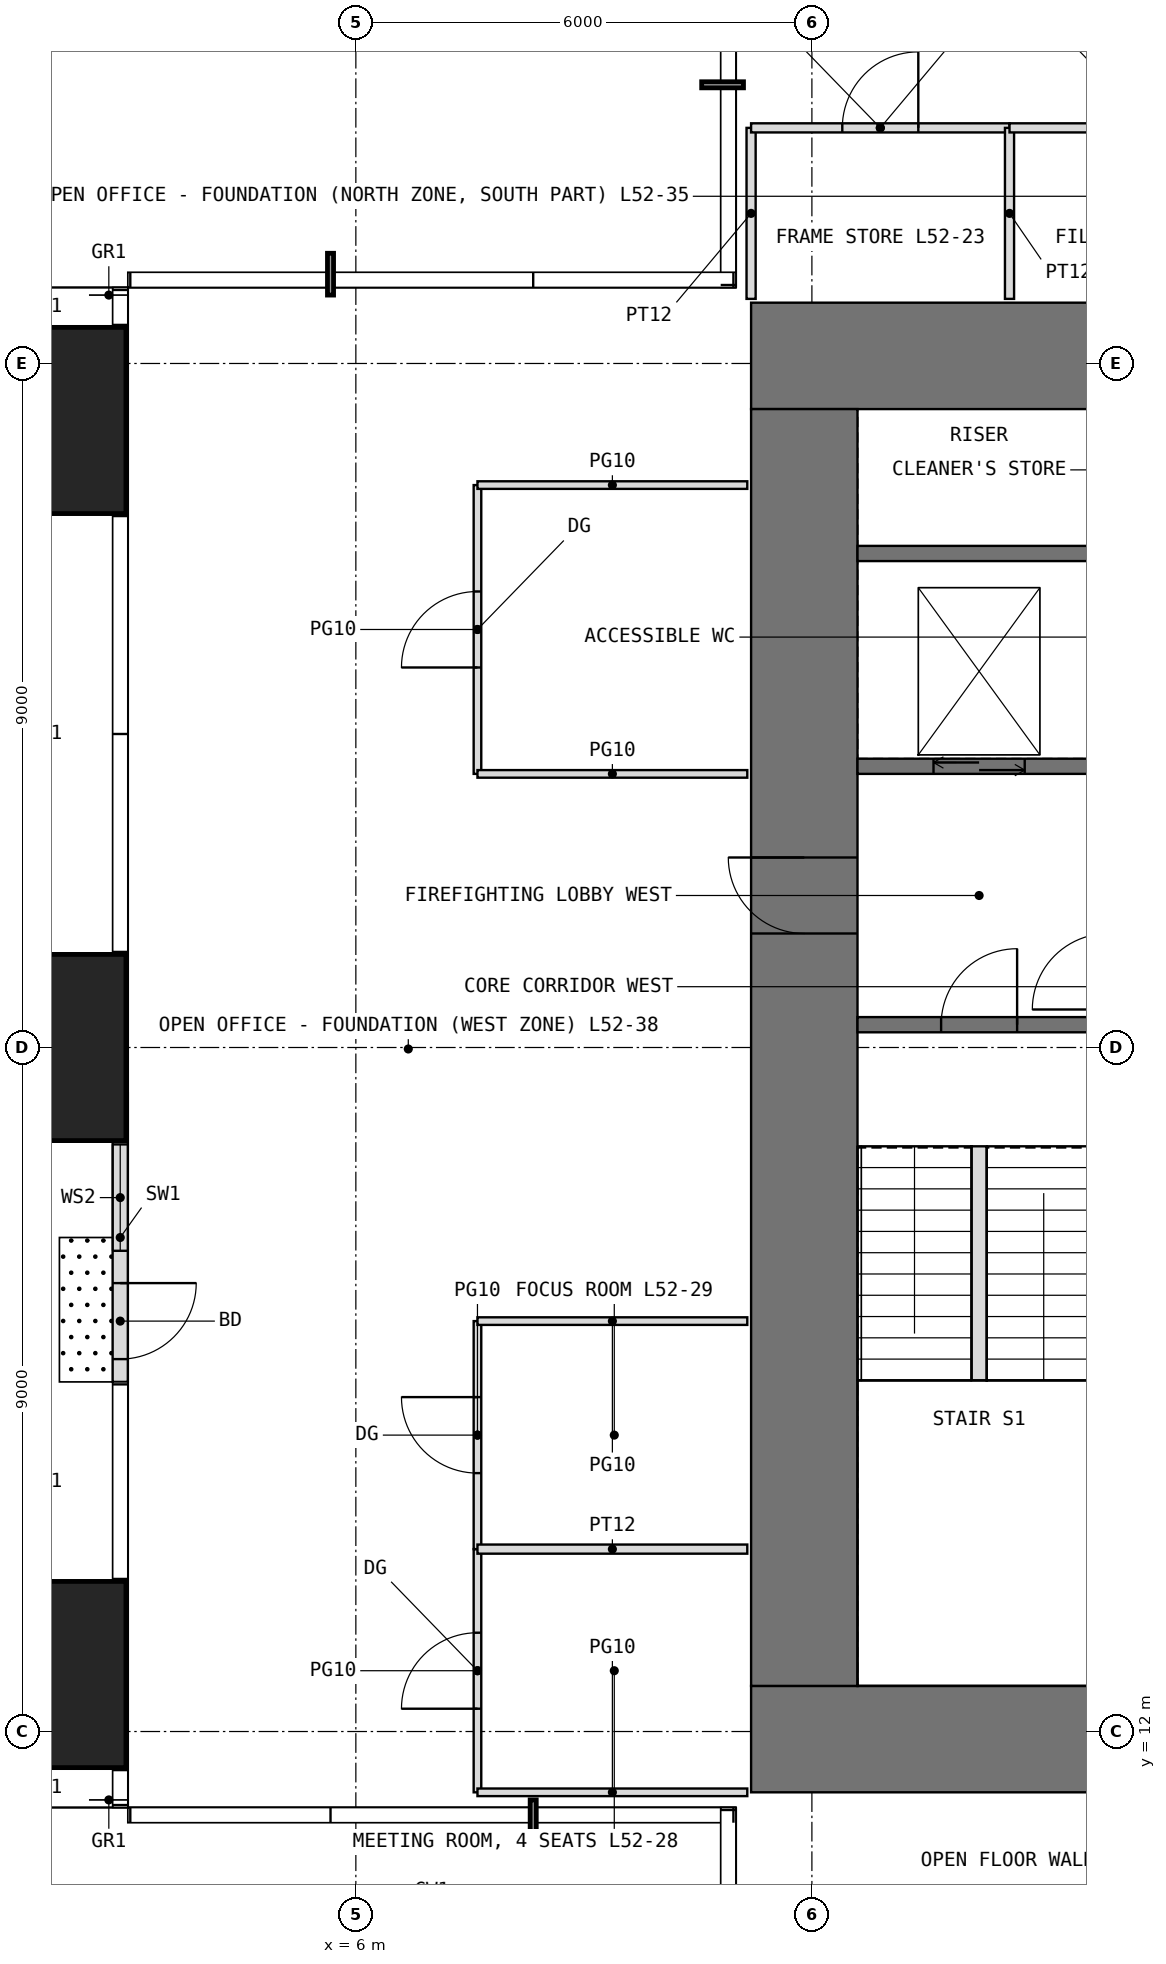
"""IFC4 building model, lengths in metres.
Left out: names, types, materials, properties, quantities, classifications, styles, units other than length and angle.
Written with IfcOpenShell. Run it as: python <this file> out.ifc"""

import sys

from ifc_helpers import new_model, si_unit, direction, frame, frame_2d, origin, origin_2d, place, context, subcontext, project, spatial, rectangle, extrude, element, fill, save


model = new_model("IFC4")
c1 = context("Model", 3, precision=1e-05, world=origin(), true_north=direction((0.0, 1.0)))
c2 = subcontext(c1, "Body", "Model", "MODEL_VIEW")
j1 = project(units=[si_unit("LENGTHUNIT", "METRE"), si_unit("PLANEANGLEUNIT", "RADIAN")], contexts=[c1])
p1 = place(None, origin())
s1 = spatial("IfcSite", under=j1, at=p1, CompositionType="ELEMENT")
p2 = place(p1, origin())
s2 = spatial("IfcBuilding", under=s1, at=p2, CompositionType="ELEMENT")
p3 = place(p2, frame((0.0, 0.0, 218.5)))
s3 = spatial("IfcBuildingStorey", under=s2, at=p3, CompositionType="ELEMENT", Elevation=218.5)
for number, where, z_axis, x_axis in (
    (1, (1.75, 12.75, 0.0), (0.0, 0.0, 1.0), (1.0, 0.0, 0.0)),
    (2, (1.75, 21.0, 0.0), (0.0, 0.0, 1.0), (1.0, 0.0, 0.0)),
    (3, (1.75, 29.25, 0.0), (0.0, 0.0, 1.0), (1.0, 0.0, 0.0)),
):
    element("IfcColumn", number, at=place(p3, frame(where, z_axis=z_axis, x_axis=x_axis)), inside=s3, PredefinedType="COLUMN", context=c2, shape_type="SweptSolid", body=[
        extrude(rectangle(XDim=2.45, YDim=2.45, at=origin_2d()), origin(), (0.0, 0.0, 1.0), 4.0),
    ])
p4 = place(p3, frame((2.9, 20.4, 0.0), z_axis=(0.0, 0.0, 1.0), x_axis=(0.0, -1.0, 0.0)))
e4 = element("IfcWall", 4, at=p4, inside=s3, PredefinedType="USERDEFINED", context=c2, shape_type="SweptSolid", body=[
    extrude(rectangle(XDim=3.8, YDim=0.2, at=frame_2d((1.9, 0.0))), origin(), (0.0, 0.0, 1.0), 3.75),
])
p5 = place(p4, frame((2.5, 0.0, 0.0)))
e5 = element("IfcOpeningElement", 5, at=p5, cuts=e4, PredefinedType="OPENING", context=c2, shape_type="SweptSolid", body=[
    extrude(rectangle(XDim=1.0, YDim=2.4, at=frame_2d((0.5, 1.2))), frame((0.0, 0.11, 0.0), z_axis=(0.0, -1.0, 0.0), x_axis=(1.0, 0.0, 0.0)), (0.0, 0.0, 1.0), 0.22),
])
p6 = place(p4, frame((0.675, 0.0, 0.3)))
e6 = element("IfcOpeningElement", 6, at=p6, cuts=e4, PredefinedType="OPENING", context=c2, shape_type="SweptSolid", body=[
    extrude(rectangle(XDim=1.4, YDim=2.7, at=frame_2d((0.7, 1.35))), frame((0.0, 0.11, 0.0), z_axis=(0.0, -1.0, 0.0), x_axis=(1.0, 0.0, 0.0)), (0.0, 0.0, 1.0), 0.22),
])
p7 = place(p3, frame((11.2, 11.9, -0.05), z_axis=(0.0, 0.0, 1.0), x_axis=(1.0, 0.0, 0.0)))
e7 = element("IfcWall", 7, at=p7, inside=s3, PredefinedType="SHEAR", context=c2, shape_type="SweptSolid", body=[
    extrude(rectangle(XDim=19.6, YDim=1.4, at=frame_2d((9.8, 0.0))), origin(), (0.0, 0.0, 1.0), 4.0),
])
p8 = place(p7, frame((8.8, 0.0, 0.05)))
e8 = element("IfcOpeningElement", 8, at=p8, cuts=e7, PredefinedType="OPENING", context=c2, shape_type="SweptSolid", body=[
    extrude(rectangle(XDim=2.0, YDim=2.2, at=frame_2d((1.0, 1.1))), frame((0.0, 0.71, 0.0), z_axis=(0.0, -1.0, 0.0), x_axis=(1.0, 0.0, 0.0)), (0.0, 0.0, 1.0), 1.42),
])
p9 = place(p3, frame((11.2, 30.1, -0.05), z_axis=(0.0, 0.0, 1.0), x_axis=(1.0, 0.0, 0.0)))
e9 = element("IfcWall", 9, at=p9, inside=s3, PredefinedType="SHEAR", context=c2, shape_type="SweptSolid", body=[
    extrude(rectangle(XDim=19.6, YDim=1.4, at=frame_2d((9.8, 0.0))), origin(), (0.0, 0.0, 1.0), 4.0),
])
p10 = place(p9, frame((8.8, 0.0, 0.05)))
e10 = element("IfcOpeningElement", 10, at=p10, cuts=e9, PredefinedType="OPENING", context=c2, shape_type="SweptSolid", body=[
    extrude(rectangle(XDim=2.0, YDim=2.2, at=frame_2d((1.0, 1.1))), frame((0.0, 0.71, 0.0), z_axis=(0.0, -1.0, 0.0), x_axis=(1.0, 0.0, 0.0)), (0.0, 0.0, 1.0), 1.42),
])
p11 = place(p3, frame((11.9, 12.6, -0.05), z_axis=(0.0, 0.0, 1.0), x_axis=(0.0, 1.0, 0.0)))
e11 = element("IfcWall", 11, at=p11, inside=s3, PredefinedType="SHEAR", context=c2, shape_type="SweptSolid", body=[
    extrude(rectangle(XDim=16.8, YDim=1.4, at=frame_2d((8.4, 0.0))), origin(), (0.0, 0.0, 1.0), 4.0),
])
p12 = place(p11, frame((9.9, 0.0, 0.05)))
e12 = element("IfcOpeningElement", 12, at=p12, cuts=e11, PredefinedType="OPENING", context=c2, shape_type="SweptSolid", body=[
    extrude(rectangle(XDim=1.0, YDim=2.2, at=frame_2d((0.5, 1.1))), frame((0.0, 0.71, 0.0), z_axis=(0.0, -1.0, 0.0), x_axis=(1.0, 0.0, 0.0)), (0.0, 0.0, 1.0), 1.42),
])
p13 = place(p3, frame((12.6, 21.3, -0.05), z_axis=(0.0, 0.0, 1.0), x_axis=(1.0, 0.0, 0.0)))
e13 = element("IfcWall", 13, at=p13, inside=s3, PredefinedType="SHEAR", context=c2, shape_type="SweptSolid", body=[
    extrude(rectangle(XDim=3.2, YDim=0.2, at=frame_2d((1.6, 0.0))), origin(), (0.0, 0.0, 1.0), 4.0),
])
p14 = place(p13, frame((1.1, 0.0, 0.05)))
e14 = element("IfcOpeningElement", 14, at=p14, cuts=e13, PredefinedType="OPENING", context=c2, shape_type="SweptSolid", body=[
    extrude(rectangle(XDim=1.0, YDim=2.2, at=frame_2d((0.5, 1.1))), frame((0.0, 0.11, 0.0), z_axis=(0.0, -1.0, 0.0), x_axis=(1.0, 0.0, 0.0)), (0.0, 0.0, 1.0), 0.22),
])
p15 = place(p3, frame((12.6, 24.7, -0.05), z_axis=(0.0, 0.0, 1.0), x_axis=(1.0, 0.0, 0.0)))
e15 = element("IfcWall", 15, at=p15, inside=s3, PredefinedType="SHEAR", context=c2, shape_type="SweptSolid", body=[
    extrude(rectangle(XDim=3.2, YDim=0.2, at=frame_2d((1.6, 0.0))), origin(), (0.0, 0.0, 1.0), 4.0),
])
p16 = place(p15, frame((1.0, 0.0, 0.05)))
e16 = element("IfcOpeningElement", 16, at=p16, cuts=e15, PredefinedType="OPENING", context=c2, shape_type="SweptSolid", body=[
    extrude(rectangle(XDim=1.2, YDim=2.2, at=frame_2d((0.6, 1.1))), frame((0.0, 0.11, 0.0), z_axis=(0.0, -1.0, 0.0), x_axis=(1.0, 0.0, 0.0)), (0.0, 0.0, 1.0), 0.22),
])
p17 = place(p3, frame((12.6, 27.5, -0.05), z_axis=(0.0, 0.0, 1.0), x_axis=(1.0, 0.0, 0.0)))
e17 = element("IfcWall", 17, at=p17, inside=s3, PredefinedType="SHEAR", context=c2, shape_type="SweptSolid", body=[
    extrude(rectangle(XDim=3.2, YDim=0.2, at=frame_2d((1.6, 0.0))), origin(), (0.0, 0.0, 1.0), 4.0),
])
p18 = place(p3, frame((7.6, 11.2, 0.0), z_axis=(0.0, 0.0, 1.0), x_axis=(0.0, 1.0, 0.0)))
e18 = element("IfcWall", 18, at=p18, inside=s3, PredefinedType="PARTITIONING", context=c2, shape_type="SweptSolid", body=[
    extrude(rectangle(XDim=3.2, YDim=0.1, at=frame_2d((1.6, 0.0))), origin(), (0.0, 0.0, 1.0), 3.75),
])
p19 = place(p18, frame((1.1, 0.0, 0.0)))
e19 = element("IfcOpeningElement", 19, at=p19, cuts=e18, PredefinedType="OPENING", context=c2, shape_type="SweptSolid", body=[
    extrude(rectangle(XDim=1.0, YDim=2.4, at=frame_2d((0.5, 1.2))), frame((0.0, 0.06, 0.0), z_axis=(0.0, -1.0, 0.0), x_axis=(1.0, 0.0, 0.0)), (0.0, 0.0, 1.0), 0.12),
])
p20 = place(p3, frame((7.6, 11.2, 0.0), z_axis=(0.0, 0.0, 1.0), x_axis=(1.0, 0.0, 0.0)))
e20 = element("IfcWall", 20, at=p20, inside=s3, PredefinedType="PARTITIONING", context=c2, shape_type="SweptSolid", body=[
    extrude(rectangle(XDim=3.55, YDim=0.1, at=frame_2d((1.775, 0.0))), origin(), (0.0, 0.0, 1.0), 3.75),
])
p21 = place(p3, frame((7.6, 14.4, 0.0), z_axis=(0.0, 0.0, 1.0), x_axis=(0.0, 1.0, 0.0)))
e21 = element("IfcWall", 21, at=p21, inside=s3, PredefinedType="PARTITIONING", context=c2, shape_type="SweptSolid", body=[
    extrude(rectangle(XDim=3.0, YDim=0.1, at=frame_2d((1.5, 0.0))), origin(), (0.0, 0.0, 1.0), 3.75),
])
p22 = place(p21, frame((1.0, 0.0, 0.0)))
e22 = element("IfcOpeningElement", 22, at=p22, cuts=e21, PredefinedType="OPENING", context=c2, shape_type="SweptSolid", body=[
    extrude(rectangle(XDim=1.0, YDim=2.4, at=frame_2d((0.5, 1.2))), frame((0.0, 0.06, 0.0), z_axis=(0.0, -1.0, 0.0), x_axis=(1.0, 0.0, 0.0)), (0.0, 0.0, 1.0), 0.12),
])
p23 = place(p3, frame((7.6, 14.4, 0.0), z_axis=(0.0, 0.0, 1.0), x_axis=(1.0, 0.0, 0.0)))
e23 = element("IfcWall", 23, at=p23, inside=s3, PredefinedType="PARTITIONING", context=c2, shape_type="SweptSolid", body=[
    extrude(rectangle(XDim=3.55, YDim=0.12, at=frame_2d((1.775, 0.0))), origin(), (0.0, 0.0, 1.0), 3.75),
])
p24 = place(p3, frame((7.6, 17.4, 0.0), z_axis=(0.0, 0.0, 1.0), x_axis=(1.0, 0.0, 0.0)))
e24 = element("IfcWall", 24, at=p24, inside=s3, PredefinedType="PARTITIONING", context=c2, shape_type="SweptSolid", body=[
    extrude(rectangle(XDim=3.55, YDim=0.1, at=frame_2d((1.775, 0.0))), origin(), (0.0, 0.0, 1.0), 3.75),
])
p25 = place(p3, frame((7.6, 24.6, 0.0), z_axis=(0.0, 0.0, 1.0), x_axis=(0.0, 1.0, 0.0)))
e25 = element("IfcWall", 25, at=p25, inside=s3, PredefinedType="PARTITIONING", context=c2, shape_type="SweptSolid", body=[
    extrude(rectangle(XDim=3.8, YDim=0.1, at=frame_2d((1.9, 0.0))), origin(), (0.0, 0.0, 1.0), 3.75),
])
p26 = place(p25, frame((1.4, 0.0, 0.0)))
e26 = element("IfcOpeningElement", 26, at=p26, cuts=e25, PredefinedType="OPENING", context=c2, shape_type="SweptSolid", body=[
    extrude(rectangle(XDim=1.0, YDim=2.4, at=frame_2d((0.5, 1.2))), frame((0.0, 0.06, 0.0), z_axis=(0.0, -1.0, 0.0), x_axis=(1.0, 0.0, 0.0)), (0.0, 0.0, 1.0), 0.12),
])
for number, where, z_axis, x_axis in (
    (27, (7.6, 24.6, 0.0), (0.0, 0.0, 1.0), (1.0, 0.0, 0.0)),
    (28, (7.6, 28.4, 0.0), (0.0, 0.0, 1.0), (1.0, 0.0, 0.0)),
):
    element("IfcWall", number, at=place(p3, frame(where, z_axis=z_axis, x_axis=x_axis)), inside=s3, PredefinedType="PARTITIONING", context=c2, shape_type="SweptSolid", body=[
        extrude(rectangle(XDim=3.55, YDim=0.1, at=frame_2d((1.775, 0.0))), origin(), (0.0, 0.0, 1.0), 3.75),
    ])
p27 = place(p3, frame((11.2, 30.85, 0.0), z_axis=(0.0, 0.0, 1.0), x_axis=(0.0, 1.0, 0.0)))
e29 = element("IfcWall", 29, at=p27, inside=s3, PredefinedType="PARTITIONING", context=c2, shape_type="SweptSolid", body=[
    extrude(rectangle(XDim=2.25, YDim=0.12, at=frame_2d((1.125, 0.0))), origin(), (0.0, 0.0, 1.0), 3.75),
])
p28 = place(p3, frame((11.2, 33.1, 0.0), z_axis=(0.0, 0.0, 1.0), x_axis=(1.0, 0.0, 0.0)))
e30 = element("IfcWall", 30, at=p28, inside=s3, PredefinedType="PARTITIONING", context=c2, shape_type="SweptSolid", body=[
    extrude(rectangle(XDim=3.4, YDim=0.12, at=frame_2d((1.7, 0.0))), origin(), (0.0, 0.0, 1.0), 3.75),
])
p29 = place(p28, frame((1.2, 0.0, 0.0)))
e31 = element("IfcOpeningElement", 31, at=p29, cuts=e30, PredefinedType="OPENING", context=c2, shape_type="SweptSolid", body=[
    extrude(rectangle(XDim=1.0, YDim=2.2, at=frame_2d((0.5, 1.1))), frame((0.0, 0.07, 0.0), z_axis=(0.0, -1.0, 0.0), x_axis=(1.0, 0.0, 0.0)), (0.0, 0.0, 1.0), 0.14),
])
p30 = place(p3, frame((14.6, 30.85, 0.0), z_axis=(0.0, 0.0, 1.0), x_axis=(0.0, 1.0, 0.0)))
e32 = element("IfcWall", 32, at=p30, inside=s3, PredefinedType="PARTITIONING", context=c2, shape_type="SweptSolid", body=[
    extrude(rectangle(XDim=2.25, YDim=0.12, at=frame_2d((1.125, 0.0))), origin(), (0.0, 0.0, 1.0), 3.75),
])
p31 = place(p3, frame((14.6, 33.1, 0.0), z_axis=(0.0, 0.0, 1.0), x_axis=(1.0, 0.0, 0.0)))
e33 = element("IfcWall", 33, at=p31, inside=s3, PredefinedType="PARTITIONING", context=c2, shape_type="SweptSolid", body=[
    extrude(rectangle(XDim=3.8, YDim=0.12, at=frame_2d((1.9, 0.0))), origin(), (0.0, 0.0, 1.0), 3.75),
])
p32 = place(p31, frame((1.4, 0.0, 0.0)))
e34 = element("IfcOpeningElement", 34, at=p32, cuts=e33, PredefinedType="OPENING", context=c2, shape_type="SweptSolid", body=[
    extrude(rectangle(XDim=1.0, YDim=2.2, at=frame_2d((0.5, 1.1))), frame((0.0, 0.07, 0.0), z_axis=(0.0, -1.0, 0.0), x_axis=(1.0, 0.0, 0.0)), (0.0, 0.0, 1.0), 0.14),
])
p33 = place(p3, frame((14.2, 16.62, 0.0), z_axis=(0.0, 0.0, 1.0), x_axis=(0.0, 1.0, 0.0)))
e35 = element("IfcWall", 35, at=p33, inside=s3, PredefinedType="PARTITIONING", context=c2, shape_type="SweptSolid", body=[
    extrude(rectangle(XDim=3.08, YDim=0.2, at=frame_2d((1.54, 0.0))), origin(), (0.0, 0.0, 1.0), 4.0),
])
p34 = place(p5, origin())
e36 = element("IfcDoor", 36, at=p34, inside=s3, OperationType="SINGLE_SWING_LEFT", PredefinedType="DOOR", context=c2, shape_type="SweptSolid", body=[
    extrude(rectangle(XDim=1.0, YDim=2.4, at=frame_2d((0.5, 1.2))), frame((0.0, 0.025, 0.0), z_axis=(0.0, -1.0, 0.0), x_axis=(1.0, 0.0, 0.0)), (0.0, 0.0, 1.0), 0.05),
])
fill(e5, e36)
p35 = place(p6, origin())
e37 = element("IfcWindow", 37, at=p35, inside=s3, PartitioningType="SINGLE_PANEL", PredefinedType="WINDOW", context=c2, shape_type="SweptSolid", body=[
    extrude(rectangle(XDim=1.4, YDim=2.7, at=frame_2d((0.7, 1.35))), frame((0.0, 0.03, 0.0), z_axis=(0.0, -1.0, 0.0), x_axis=(1.0, 0.0, 0.0)), (0.0, 0.0, 1.0), 0.06),
])
fill(e6, e37)
p36 = place(p12, origin())
e38 = element("IfcDoor", 38, at=p36, inside=s3, OperationType="SINGLE_SWING_RIGHT", PredefinedType="DOOR", context=c2, shape_type="SweptSolid", body=[
    extrude(rectangle(XDim=1.0, YDim=2.2, at=frame_2d((0.5, 1.1))), frame((0.0, 0.025, 0.0), z_axis=(0.0, -1.0, 0.0), x_axis=(1.0, 0.0, 0.0)), (0.0, 0.0, 1.0), 0.05),
])
fill(e12, e38)
p37 = place(p14, origin())
e39 = element("IfcDoor", 39, at=p37, inside=s3, OperationType="SINGLE_SWING_RIGHT", PredefinedType="DOOR", context=c2, shape_type="SweptSolid", body=[
    extrude(rectangle(XDim=1.0, YDim=2.2, at=frame_2d((0.5, 1.1))), frame((0.0, 0.025, 0.0), z_axis=(0.0, -1.0, 0.0), x_axis=(1.0, 0.0, 0.0)), (0.0, 0.0, 1.0), 0.05),
])
fill(e14, e39)
p38 = place(p29, origin())
e40 = element("IfcDoor", 40, at=p38, inside=s3, OperationType="SINGLE_SWING_RIGHT", PredefinedType="DOOR", context=c2, shape_type="SweptSolid", body=[
    extrude(rectangle(XDim=1.0, YDim=2.2, at=frame_2d((0.5, 1.1))), frame((0.0, 0.025, 0.0), z_axis=(0.0, -1.0, 0.0), x_axis=(1.0, 0.0, 0.0)), (0.0, 0.0, 1.0), 0.05),
])
fill(e31, e40)
p39 = place(p19, origin())
e41 = element("IfcDoor", 41, at=p39, inside=s3, OperationType="SINGLE_SWING_LEFT", PredefinedType="DOOR", context=c2, shape_type="SweptSolid", body=[
    extrude(rectangle(XDim=1.0, YDim=2.4, at=frame_2d((0.5, 1.2))), frame((0.0, 0.025, 0.0), z_axis=(0.0, -1.0, 0.0), x_axis=(1.0, 0.0, 0.0)), (0.0, 0.0, 1.0), 0.05),
])
fill(e19, e41)
p40 = place(p22, origin())
e42 = element("IfcDoor", 42, at=p40, inside=s3, OperationType="SINGLE_SWING_RIGHT", PredefinedType="DOOR", context=c2, shape_type="SweptSolid", body=[
    extrude(rectangle(XDim=1.0, YDim=2.4, at=frame_2d((0.5, 1.2))), frame((0.0, 0.025, 0.0), z_axis=(0.0, -1.0, 0.0), x_axis=(1.0, 0.0, 0.0)), (0.0, 0.0, 1.0), 0.05),
])
fill(e22, e42)
p41 = place(p26, origin())
e43 = element("IfcDoor", 43, at=p41, inside=s3, OperationType="SINGLE_SWING_LEFT", PredefinedType="DOOR", context=c2, shape_type="SweptSolid", body=[
    extrude(rectangle(XDim=1.0, YDim=2.4, at=frame_2d((0.5, 1.2))), frame((0.0, 0.025, 0.0), z_axis=(0.0, -1.0, 0.0), x_axis=(1.0, 0.0, 0.0)), (0.0, 0.0, 1.0), 0.05),
])
fill(e26, e43)
p42 = place(p16, origin())
e44 = element("IfcDoor", 44, at=p42, inside=s3, OperationType="DOUBLE_DOOR_SLIDING", PredefinedType="DOOR", context=c2, shape_type="SweptSolid", body=[
    extrude(rectangle(XDim=1.2, YDim=2.2, at=frame_2d((0.6, 1.1))), frame((0.0, 0.025, 0.0), z_axis=(0.0, -1.0, 0.0), x_axis=(1.0, 0.0, 0.0)), (0.0, 0.0, 1.0), 0.05),
])
fill(e16, e44)
save(model, sys.argv[1])
